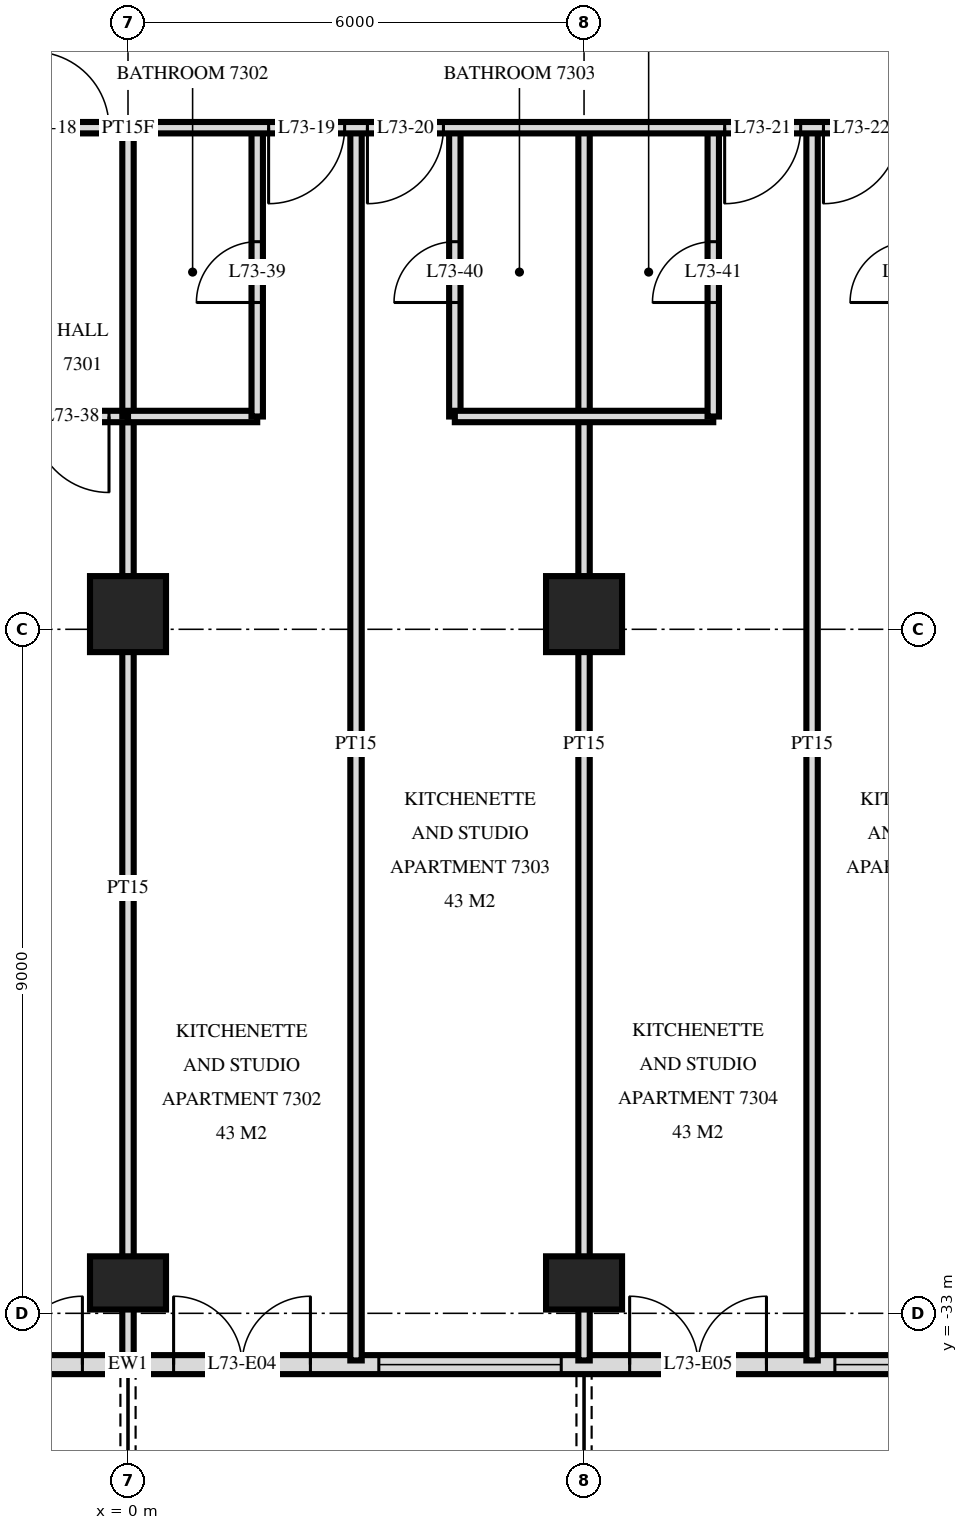
"""IFC4 building model, lengths in metres.
Left out: names, types, materials, properties, quantities, classifications, styles, units other than length and angle.
Written with IfcOpenShell. Run it as: python <this file> out.ifc"""

import sys

from ifc_helpers import new_model, si_unit, direction, frame, frame_2d, origin, origin_2d, place, context, subcontext, project, spatial, rectangle, extrude, element, fill, save


model = new_model("IFC4")
c1 = context("Model", 3, precision=1e-05, world=origin(), true_north=direction((0.0, 1.0)))
c2 = subcontext(c1, "Body", "Model", "MODEL_VIEW")
j1 = project(units=[si_unit("LENGTHUNIT", "METRE"), si_unit("PLANEANGLEUNIT", "RADIAN")], contexts=[c1])
p1 = place(None, origin())
s1 = spatial("IfcSite", under=j1, at=p1, CompositionType="ELEMENT")
p2 = place(p1, origin())
s2 = spatial("IfcBuilding", under=s1, at=p2, CompositionType="ELEMENT")
p3 = place(p2, frame((0.0, 0.0, 277.1)))
s3 = spatial("IfcBuildingStorey", under=s2, at=p3, CompositionType="ELEMENT", Elevation=277.1)
p4 = place(p3, frame((0.0, -32.6, 0.0), z_axis=(0.0, 0.0, 1.0), x_axis=(1.0, 0.0, 0.0)))
e1 = element("IfcColumn", 1, at=p4, inside=s3, PredefinedType="COLUMN", context=c2, shape_type="SweptSolid", body=[
    extrude(rectangle(XDim=1.0, YDim=0.7, at=origin_2d()), origin(), (0.0, 0.0, 1.0), 3.5),
])
p5 = place(p3, frame((0.0, -23.8, 0.0), z_axis=(0.0, 0.0, 1.0), x_axis=(1.0, 0.0, 0.0)))
e2 = element("IfcColumn", 2, at=p5, inside=s3, PredefinedType="COLUMN", context=c2, shape_type="SweptSolid", body=[
    extrude(rectangle(XDim=1.0, YDim=1.0, at=origin_2d()), origin(), (0.0, 0.0, 1.0), 3.5),
])
p6 = place(p3, frame((6.0, -32.6, 0.0), z_axis=(0.0, 0.0, 1.0), x_axis=(1.0, 0.0, 0.0)))
e3 = element("IfcColumn", 3, at=p6, inside=s3, PredefinedType="COLUMN", context=c2, shape_type="SweptSolid", body=[
    extrude(rectangle(XDim=1.0, YDim=0.7, at=origin_2d()), origin(), (0.0, 0.0, 1.0), 3.5),
])
p7 = place(p3, frame((6.0, -23.8, 0.0), z_axis=(0.0, 0.0, 1.0), x_axis=(1.0, 0.0, 0.0)))
e4 = element("IfcColumn", 4, at=p7, inside=s3, PredefinedType="COLUMN", context=c2, shape_type="SweptSolid", body=[
    extrude(rectangle(XDim=1.0, YDim=1.0, at=origin_2d()), origin(), (0.0, 0.0, 1.0), 3.5),
])
p8 = place(p3, frame((-18.575, -33.675, 0.0), z_axis=(0.0, 0.0, 1.0), x_axis=(1.0, 0.0, 0.0)))
e5 = element("IfcWall", 5, at=p8, inside=s3, PredefinedType="SOLIDWALL", context=c2, shape_type="SweptSolid", body=[
    extrude(rectangle(XDim=37.151, YDim=0.25, at=frame_2d((18.575, 0.0))), origin(), (0.0, 0.0, 1.0), 3.22),
])
p9 = place(p8, frame((4.175, 0.0, 0.0)))
e6 = element("IfcOpeningElement", 6, at=p9, cuts=e5, PredefinedType="OPENING", context=c2, shape_type="SweptSolid", body=[
    extrude(rectangle(XDim=1.8, YDim=2.4, at=frame_2d((0.9, 1.2))), frame((0.0, 0.135, 0.0), z_axis=(0.0, -1.0, 0.0), x_axis=(1.0, 0.0, 0.0)), (0.0, 0.0, 1.0), 0.27),
])
p10 = place(p8, frame((7.512, 0.0, 0.0)))
e7 = element("IfcOpeningElement", 7, at=p10, cuts=e5, PredefinedType="OPENING", context=c2, shape_type="SweptSolid", body=[
    extrude(rectangle(XDim=1.8, YDim=2.4, at=frame_2d((0.9, 1.2))), frame((0.0, 0.135, 0.0), z_axis=(0.0, -1.0, 0.0), x_axis=(1.0, 0.0, 0.0)), (0.0, 0.0, 1.0), 0.27),
])
p11 = place(p8, frame((10.287, 0.0, 0.9)))
e8 = element("IfcOpeningElement", 8, at=p11, cuts=e5, PredefinedType="OPENING", context=c2, shape_type="SweptSolid", body=[
    extrude(rectangle(XDim=1.8, YDim=1.5, at=frame_2d((0.9, 0.75))), frame((0.0, 0.135, 0.0), z_axis=(0.0, -1.0, 0.0), x_axis=(1.0, 0.0, 0.0)), (0.0, 0.0, 1.0), 0.27),
])
p12 = place(p8, frame((12.875, 0.0, 0.9)))
e9 = element("IfcOpeningElement", 9, at=p12, cuts=e5, PredefinedType="OPENING", context=c2, shape_type="SweptSolid", body=[
    extrude(rectangle(XDim=2.4, YDim=1.5, at=frame_2d((1.2, 0.75))), frame((0.0, 0.135, 0.0), z_axis=(0.0, -1.0, 0.0), x_axis=(1.0, 0.0, 0.0)), (0.0, 0.0, 1.0), 0.27),
])
p13 = place(p8, frame((16.175, 0.0, 0.0)))
e10 = element("IfcOpeningElement", 10, at=p13, cuts=e5, PredefinedType="OPENING", context=c2, shape_type="SweptSolid", body=[
    extrude(rectangle(XDim=1.8, YDim=2.4, at=frame_2d((0.9, 1.2))), frame((0.0, 0.135, 0.0), z_axis=(0.0, -1.0, 0.0), x_axis=(1.0, 0.0, 0.0)), (0.0, 0.0, 1.0), 0.27),
])
p14 = place(p8, frame((19.175, 0.0, 0.0)))
e11 = element("IfcOpeningElement", 11, at=p14, cuts=e5, PredefinedType="OPENING", context=c2, shape_type="SweptSolid", body=[
    extrude(rectangle(XDim=1.8, YDim=2.4, at=frame_2d((0.9, 1.2))), frame((0.0, 0.135, 0.0), z_axis=(0.0, -1.0, 0.0), x_axis=(1.0, 0.0, 0.0)), (0.0, 0.0, 1.0), 0.27),
])
p15 = place(p8, frame((21.875, 0.0, 0.9)))
e12 = element("IfcOpeningElement", 12, at=p15, cuts=e5, PredefinedType="OPENING", context=c2, shape_type="SweptSolid", body=[
    extrude(rectangle(XDim=2.4, YDim=1.5, at=frame_2d((1.2, 0.75))), frame((0.0, 0.135, 0.0), z_axis=(0.0, -1.0, 0.0), x_axis=(1.0, 0.0, 0.0)), (0.0, 0.0, 1.0), 0.27),
])
p16 = place(p8, frame((25.175, 0.0, 0.0)))
e13 = element("IfcOpeningElement", 13, at=p16, cuts=e5, PredefinedType="OPENING", context=c2, shape_type="SweptSolid", body=[
    extrude(rectangle(XDim=1.8, YDim=2.4, at=frame_2d((0.9, 1.2))), frame((0.0, 0.135, 0.0), z_axis=(0.0, -1.0, 0.0), x_axis=(1.0, 0.0, 0.0)), (0.0, 0.0, 1.0), 0.27),
])
p17 = place(p8, frame((27.875, 0.0, 0.9)))
e14 = element("IfcOpeningElement", 14, at=p17, cuts=e5, PredefinedType="OPENING", context=c2, shape_type="SweptSolid", body=[
    extrude(rectangle(XDim=2.4, YDim=1.5, at=frame_2d((1.2, 0.75))), frame((0.0, 0.135, 0.0), z_axis=(0.0, -1.0, 0.0), x_axis=(1.0, 0.0, 0.0)), (0.0, 0.0, 1.0), 0.27),
])
p18 = place(p8, frame((30.95, 0.0, 0.9)))
e15 = element("IfcOpeningElement", 15, at=p18, cuts=e5, PredefinedType="OPENING", context=c2, shape_type="SweptSolid", body=[
    extrude(rectangle(XDim=1.8, YDim=1.5, at=frame_2d((0.9, 0.75))), frame((0.0, 0.135, 0.0), z_axis=(0.0, -1.0, 0.0), x_axis=(1.0, 0.0, 0.0)), (0.0, 0.0, 1.0), 0.27),
])
p19 = place(p8, frame((34.175, 0.0, 0.0)))
e16 = element("IfcOpeningElement", 16, at=p19, cuts=e5, PredefinedType="OPENING", context=c2, shape_type="SweptSolid", body=[
    extrude(rectangle(XDim=1.8, YDim=2.4, at=frame_2d((0.9, 1.2))), frame((0.0, 0.135, 0.0), z_axis=(0.0, -1.0, 0.0), x_axis=(1.0, 0.0, 0.0)), (0.0, 0.0, 1.0), 0.27),
])
p20 = place(p3, frame((9.0, -33.62, 0.0), z_axis=(0.0, 0.0, 1.0), x_axis=(0.0, 1.0, 0.0)))
e17 = element("IfcWall", 17, at=p20, inside=s3, PredefinedType="PARTITIONING", context=c2, shape_type="SweptSolid", body=[
    extrude(rectangle(XDim=16.22, YDim=0.15, at=frame_2d((8.11, 0.0))), origin(), (0.0, 0.0, 1.0), 3.22),
])
p21 = place(p3, frame((7.7, -21.2, 0.0), z_axis=(0.0, 0.0, 1.0), x_axis=(0.0, 1.0, 0.0)))
e18 = element("IfcWall", 18, at=p21, inside=s3, PredefinedType="PARTITIONING", context=c2, shape_type="SweptSolid", body=[
    extrude(rectangle(XDim=3.8, YDim=0.15, at=frame_2d((1.9, 0.0))), origin(), (0.0, 0.0, 1.0), 3.22),
])
p22 = place(p21, frame((1.5, 0.0, 0.0)))
e19 = element("IfcOpeningElement", 19, at=p22, cuts=e18, PredefinedType="OPENING", context=c2, shape_type="SweptSolid", body=[
    extrude(rectangle(XDim=0.8, YDim=2.1, at=frame_2d((0.4, 1.05))), frame((0.0, 0.085, 0.0), z_axis=(0.0, -1.0, 0.0), x_axis=(1.0, 0.0, 0.0)), (0.0, 0.0, 1.0), 0.17),
])
p23 = place(p3, frame((6.0, -33.62, 0.0), z_axis=(0.0, 0.0, 1.0), x_axis=(0.0, 1.0, 0.0)))
e20 = element("IfcWall", 20, at=p23, inside=s3, PredefinedType="PARTITIONING", context=c2, shape_type="SweptSolid", body=[
    extrude(rectangle(XDim=16.22, YDim=0.15, at=frame_2d((8.11, 0.0))), origin(), (0.0, 0.0, 1.0), 3.22),
])
p24 = place(p3, frame((4.3, -21.2, 0.0), z_axis=(0.0, 0.0, 1.0), x_axis=(0.0, 1.0, 0.0)))
e21 = element("IfcWall", 21, at=p24, inside=s3, PredefinedType="PARTITIONING", context=c2, shape_type="SweptSolid", body=[
    extrude(rectangle(XDim=3.8, YDim=0.15, at=frame_2d((1.9, 0.0))), origin(), (0.0, 0.0, 1.0), 3.22),
])
p25 = place(p24, frame((1.5, 0.0, 0.0)))
e22 = element("IfcOpeningElement", 22, at=p25, cuts=e21, PredefinedType="OPENING", context=c2, shape_type="SweptSolid", body=[
    extrude(rectangle(XDim=0.8, YDim=2.1, at=frame_2d((0.4, 1.05))), frame((0.0, 0.085, 0.0), z_axis=(0.0, -1.0, 0.0), x_axis=(1.0, 0.0, 0.0)), (0.0, 0.0, 1.0), 0.17),
])
p26 = place(p3, frame((3.0, -33.62, 0.0), z_axis=(0.0, 0.0, 1.0), x_axis=(0.0, 1.0, 0.0)))
e23 = element("IfcWall", 23, at=p26, inside=s3, PredefinedType="PARTITIONING", context=c2, shape_type="SweptSolid", body=[
    extrude(rectangle(XDim=16.22, YDim=0.15, at=frame_2d((8.11, 0.0))), origin(), (0.0, 0.0, 1.0), 3.22),
])
p27 = place(p3, frame((1.7, -21.2, 0.0), z_axis=(0.0, 0.0, 1.0), x_axis=(0.0, 1.0, 0.0)))
e24 = element("IfcWall", 24, at=p27, inside=s3, PredefinedType="PARTITIONING", context=c2, shape_type="SweptSolid", body=[
    extrude(rectangle(XDim=3.8, YDim=0.15, at=frame_2d((1.9, 0.0))), origin(), (0.0, 0.0, 1.0), 3.22),
])
p28 = place(p27, frame((1.5, 0.0, 0.0)))
e25 = element("IfcOpeningElement", 25, at=p28, cuts=e24, PredefinedType="OPENING", context=c2, shape_type="SweptSolid", body=[
    extrude(rectangle(XDim=0.8, YDim=2.1, at=frame_2d((0.4, 1.05))), frame((0.0, 0.085, 0.0), z_axis=(0.0, -1.0, 0.0), x_axis=(1.0, 0.0, 0.0)), (0.0, 0.0, 1.0), 0.17),
])
p29 = place(p3, frame((0.0, -21.2, 0.0), z_axis=(0.0, 0.0, 1.0), x_axis=(0.0, 1.0, 0.0)))
e26 = element("IfcWall", 26, at=p29, inside=s3, PredefinedType="PARTITIONING", context=c2, shape_type="SweptSolid", body=[
    extrude(rectangle(XDim=3.8, YDim=0.15, at=frame_2d((1.9, 0.0))), origin(), (0.0, 0.0, 1.0), 3.22),
])
p30 = place(p3, frame((0.0, -33.62, 0.0), z_axis=(0.0, 0.0, 1.0), x_axis=(0.0, 1.0, 0.0)))
e27 = element("IfcWall", 27, at=p30, inside=s3, PredefinedType="PARTITIONING", context=c2, shape_type="SweptSolid", body=[
    extrude(rectangle(XDim=12.42, YDim=0.15, at=frame_2d((6.21, 0.0))), origin(), (0.0, 0.0, 1.0), 3.22),
])
p31 = place(p3, frame((-1.5, -21.2, 0.0), z_axis=(0.0, 0.0, 1.0), x_axis=(1.0, 0.0, 0.0)))
e28 = element("IfcWall", 28, at=p31, inside=s3, PredefinedType="PARTITIONING", context=c2, shape_type="SweptSolid", body=[
    extrude(rectangle(XDim=1.5, YDim=0.15, at=frame_2d((0.75, 0.0))), origin(), (0.0, 0.0, 1.0), 3.22),
])
p32 = place(p31, frame((0.25, 0.0, 0.0)))
e29 = element("IfcOpeningElement", 29, at=p32, cuts=e28, PredefinedType="OPENING", context=c2, shape_type="SweptSolid", body=[
    extrude(rectangle(XDim=1.0, YDim=2.1, at=frame_2d((0.5, 1.05))), frame((0.0, 0.085, 0.0), z_axis=(0.0, -1.0, 0.0), x_axis=(1.0, 0.0, 0.0)), (0.0, 0.0, 1.0), 0.17),
])
p33 = place(p3, frame((0.0, -21.2, 0.0), z_axis=(0.0, 0.0, 1.0), x_axis=(1.0, 0.0, 0.0)))
e30 = element("IfcWall", 30, at=p33, inside=s3, PredefinedType="PARTITIONING", context=c2, shape_type="SweptSolid", body=[
    extrude(rectangle(XDim=1.7, YDim=0.15, at=frame_2d((0.85, 0.0))), origin(), (0.0, 0.0, 1.0), 3.22),
])
p34 = place(p3, frame((4.3, -21.2, 0.0), z_axis=(0.0, 0.0, 1.0), x_axis=(1.0, 0.0, 0.0)))
e31 = element("IfcWall", 31, at=p34, inside=s3, PredefinedType="PARTITIONING", context=c2, shape_type="SweptSolid", body=[
    extrude(rectangle(XDim=3.4, YDim=0.15, at=frame_2d((1.7, 0.0))), origin(), (0.0, 0.0, 1.0), 3.22),
])
p35 = place(p3, frame((-22.92, -17.4, 0.0), z_axis=(0.0, 0.0, 1.0), x_axis=(1.0, 0.0, 0.0)))
e32 = element("IfcWall", 32, at=p35, inside=s3, PredefinedType="PARTITIONING", context=c2, shape_type="SweptSolid", body=[
    extrude(rectangle(XDim=45.84, YDim=0.15, at=frame_2d((22.92, 0.0))), origin(), (0.0, 0.0, 1.0), 3.22),
])
p36 = place(p35, frame((21.67, 0.0, 0.0)))
e33 = element("IfcOpeningElement", 33, at=p36, cuts=e32, PredefinedType="OPENING", context=c2, shape_type="SweptSolid", body=[
    extrude(rectangle(XDim=1.0, YDim=2.1, at=frame_2d((0.5, 1.05))), frame((0.0, 0.085, 0.0), z_axis=(0.0, -1.0, 0.0), x_axis=(1.0, 0.0, 0.0)), (0.0, 0.0, 1.0), 0.17),
])
p37 = place(p35, frame((24.77, 0.0, 0.0)))
e34 = element("IfcOpeningElement", 34, at=p37, cuts=e32, PredefinedType="OPENING", context=c2, shape_type="SweptSolid", body=[
    extrude(rectangle(XDim=1.0, YDim=2.1, at=frame_2d((0.5, 1.05))), frame((0.0, 0.085, 0.0), z_axis=(0.0, -1.0, 0.0), x_axis=(1.0, 0.0, 0.0)), (0.0, 0.0, 1.0), 0.17),
])
p38 = place(p35, frame((26.07, 0.0, 0.0)))
e35 = element("IfcOpeningElement", 35, at=p38, cuts=e32, PredefinedType="OPENING", context=c2, shape_type="SweptSolid", body=[
    extrude(rectangle(XDim=1.0, YDim=2.1, at=frame_2d((0.5, 1.05))), frame((0.0, 0.085, 0.0), z_axis=(0.0, -1.0, 0.0), x_axis=(1.0, 0.0, 0.0)), (0.0, 0.0, 1.0), 0.17),
])
p39 = place(p35, frame((30.77, 0.0, 0.0)))
e36 = element("IfcOpeningElement", 36, at=p39, cuts=e32, PredefinedType="OPENING", context=c2, shape_type="SweptSolid", body=[
    extrude(rectangle(XDim=1.0, YDim=2.1, at=frame_2d((0.5, 1.05))), frame((0.0, 0.085, 0.0), z_axis=(0.0, -1.0, 0.0), x_axis=(1.0, 0.0, 0.0)), (0.0, 0.0, 1.0), 0.17),
])
p40 = place(p35, frame((32.07, 0.0, 0.0)))
e37 = element("IfcOpeningElement", 37, at=p40, cuts=e32, PredefinedType="OPENING", context=c2, shape_type="SweptSolid", body=[
    extrude(rectangle(XDim=1.0, YDim=2.1, at=frame_2d((0.5, 1.05))), frame((0.0, 0.085, 0.0), z_axis=(0.0, -1.0, 0.0), x_axis=(1.0, 0.0, 0.0)), (0.0, 0.0, 1.0), 0.17),
])
p41 = place(p35, frame((9.42, 0.0, 0.0)))
e38 = element("IfcOpeningElement", 38, at=p41, cuts=e32, PredefinedType="OPENING", context=c2, shape_type="SweptSolid", body=[
    extrude(rectangle(XDim=1.0, YDim=2.1, at=frame_2d((0.5, 1.05))), frame((0.0, 0.085, 0.0), z_axis=(0.0, -1.0, 0.0), x_axis=(1.0, 0.0, 0.0)), (0.0, 0.0, 1.0), 0.17),
])
p42 = place(p35, frame((2.67, 0.0, 0.0)))
e39 = element("IfcOpeningElement", 39, at=p42, cuts=e32, PredefinedType="OPENING", context=c2, shape_type="SweptSolid", body=[
    extrude(rectangle(XDim=1.0, YDim=2.1, at=frame_2d((0.5, 1.05))), frame((0.0, 0.085, 0.0), z_axis=(0.0, -1.0, 0.0), x_axis=(1.0, 0.0, 0.0)), (0.0, 0.0, 1.0), 0.17),
])
p43 = place(p35, frame((37.82, 0.0, 0.0)))
e40 = element("IfcOpeningElement", 40, at=p43, cuts=e32, PredefinedType="OPENING", context=c2, shape_type="SweptSolid", body=[
    extrude(rectangle(XDim=1.0, YDim=2.1, at=frame_2d((0.5, 1.05))), frame((0.0, 0.085, 0.0), z_axis=(0.0, -1.0, 0.0), x_axis=(1.0, 0.0, 0.0)), (0.0, 0.0, 1.0), 0.17),
])
p44 = place(p13, origin())
e41 = element("IfcDoor", 41, at=p44, inside=s3, OperationType="DOUBLE_DOOR_SINGLE_SWING", PredefinedType="DOOR", context=c2, shape_type="SweptSolid", body=[
    extrude(rectangle(XDim=1.8, YDim=2.4, at=frame_2d((0.9, 1.2))), frame((0.0, 0.025, 0.0), z_axis=(0.0, -1.0, 0.0), x_axis=(1.0, 0.0, 0.0)), (0.0, 0.0, 1.0), 0.05),
])
fill(e10, e41)
p45 = place(p14, origin())
e42 = element("IfcDoor", 42, at=p45, inside=s3, OperationType="DOUBLE_DOOR_SINGLE_SWING", PredefinedType="DOOR", context=c2, shape_type="SweptSolid", body=[
    extrude(rectangle(XDim=1.8, YDim=2.4, at=frame_2d((0.9, 1.2))), frame((0.0, 0.025, 0.0), z_axis=(0.0, -1.0, 0.0), x_axis=(1.0, 0.0, 0.0)), (0.0, 0.0, 1.0), 0.05),
])
fill(e11, e42)
p46 = place(p15, origin())
e43 = element("IfcWindow", 43, at=p46, inside=s3, PartitioningType="SINGLE_PANEL", PredefinedType="WINDOW", context=c2, shape_type="SweptSolid", body=[
    extrude(rectangle(XDim=2.4, YDim=1.5, at=frame_2d((1.2, 0.75))), frame((0.0, 0.03, 0.0), z_axis=(0.0, -1.0, 0.0), x_axis=(1.0, 0.0, 0.0)), (0.0, 0.0, 1.0), 0.06),
])
fill(e12, e43)
p47 = place(p16, origin())
e44 = element("IfcDoor", 44, at=p47, inside=s3, OperationType="DOUBLE_DOOR_SINGLE_SWING", PredefinedType="DOOR", context=c2, shape_type="SweptSolid", body=[
    extrude(rectangle(XDim=1.8, YDim=2.4, at=frame_2d((0.9, 1.2))), frame((0.0, 0.025, 0.0), z_axis=(0.0, -1.0, 0.0), x_axis=(1.0, 0.0, 0.0)), (0.0, 0.0, 1.0), 0.05),
])
fill(e13, e44)
p48 = place(p17, origin())
e45 = element("IfcWindow", 45, at=p48, inside=s3, PartitioningType="SINGLE_PANEL", PredefinedType="WINDOW", context=c2, shape_type="SweptSolid", body=[
    extrude(rectangle(XDim=2.4, YDim=1.5, at=frame_2d((1.2, 0.75))), frame((0.0, 0.03, 0.0), z_axis=(0.0, -1.0, 0.0), x_axis=(1.0, 0.0, 0.0)), (0.0, 0.0, 1.0), 0.06),
])
fill(e14, e45)
p49 = place(p36, origin())
e46 = element("IfcDoor", 46, at=p49, inside=s3, OperationType="SINGLE_SWING_RIGHT", PredefinedType="DOOR", context=c2, shape_type="SweptSolid", body=[
    extrude(rectangle(XDim=1.0, YDim=2.1, at=frame_2d((0.5, 1.05))), frame((0.0, 0.025, 0.0), z_axis=(0.0, -1.0, 0.0), x_axis=(1.0, 0.0, 0.0)), (0.0, 0.0, 1.0), 0.05),
])
fill(e33, e46)
p50 = place(p37, frame((0.5, 0.0, 0.0), z_axis=(0.0, 0.0, 1.0), x_axis=(-1.0, 0.0, 0.0)))
e47 = element("IfcDoor", 47, at=p50, inside=s3, OperationType="SINGLE_SWING_LEFT", PredefinedType="DOOR", context=c2, shape_type="SweptSolid", body=[
    extrude(rectangle(XDim=1.0, YDim=2.1, at=frame_2d((0.0, 1.05))), frame((0.0, -0.025, 0.0), z_axis=(0.0, 1.0, 0.0), x_axis=(-1.0, 0.0, 0.0)), (0.0, 0.0, 1.0), 0.05),
])
fill(e34, e47)
p51 = place(p38, frame((0.5, 0.0, 0.0), z_axis=(0.0, 0.0, 1.0), x_axis=(-1.0, 0.0, 0.0)))
e48 = element("IfcDoor", 48, at=p51, inside=s3, OperationType="SINGLE_SWING_LEFT", PredefinedType="DOOR", context=c2, shape_type="SweptSolid", body=[
    extrude(rectangle(XDim=1.0, YDim=2.1, at=frame_2d((0.0, 1.05))), frame((0.0, -0.025, 0.0), z_axis=(0.0, 1.0, 0.0), x_axis=(-1.0, 0.0, 0.0)), (0.0, 0.0, 1.0), 0.05),
])
fill(e35, e48)
p52 = place(p39, frame((0.5, 0.0, 0.0), z_axis=(0.0, 0.0, 1.0), x_axis=(-1.0, 0.0, 0.0)))
e49 = element("IfcDoor", 49, at=p52, inside=s3, OperationType="SINGLE_SWING_LEFT", PredefinedType="DOOR", context=c2, shape_type="SweptSolid", body=[
    extrude(rectangle(XDim=1.0, YDim=2.1, at=frame_2d((0.0, 1.05))), frame((0.0, -0.025, 0.0), z_axis=(0.0, 1.0, 0.0), x_axis=(-1.0, 0.0, 0.0)), (0.0, 0.0, 1.0), 0.05),
])
fill(e36, e49)
p53 = place(p40, frame((0.5, 0.0, 0.0), z_axis=(0.0, 0.0, 1.0), x_axis=(-1.0, 0.0, 0.0)))
e50 = element("IfcDoor", 50, at=p53, inside=s3, OperationType="SINGLE_SWING_LEFT", PredefinedType="DOOR", context=c2, shape_type="SweptSolid", body=[
    extrude(rectangle(XDim=1.0, YDim=2.1, at=frame_2d((0.0, 1.05))), frame((0.0, -0.025, 0.0), z_axis=(0.0, 1.0, 0.0), x_axis=(-1.0, 0.0, 0.0)), (0.0, 0.0, 1.0), 0.05),
])
fill(e37, e50)
p54 = place(p32, frame((0.5, 0.0, 0.0), z_axis=(0.0, 0.0, 1.0), x_axis=(-1.0, 0.0, 0.0)))
e51 = element("IfcDoor", 51, at=p54, inside=s3, OperationType="SINGLE_SWING_RIGHT", PredefinedType="DOOR", context=c2, shape_type="SweptSolid", body=[
    extrude(rectangle(XDim=1.0, YDim=2.1, at=frame_2d((0.0, 1.05))), frame((0.0, -0.025, 0.0), z_axis=(0.0, 1.0, 0.0), x_axis=(-1.0, 0.0, 0.0)), (0.0, 0.0, 1.0), 0.05),
])
fill(e29, e51)
p55 = place(p28, origin())
e52 = element("IfcDoor", 52, at=p55, inside=s3, OperationType="SINGLE_SWING_RIGHT", PredefinedType="DOOR", context=c2, shape_type="SweptSolid", body=[
    extrude(rectangle(XDim=0.8, YDim=2.1, at=frame_2d((0.4, 1.05))), frame((0.0, 0.025, 0.0), z_axis=(0.0, -1.0, 0.0), x_axis=(1.0, 0.0, 0.0)), (0.0, 0.0, 1.0), 0.05),
])
fill(e25, e52)
p56 = place(p25, origin())
e53 = element("IfcDoor", 53, at=p56, inside=s3, OperationType="SINGLE_SWING_RIGHT", PredefinedType="DOOR", context=c2, shape_type="SweptSolid", body=[
    extrude(rectangle(XDim=0.8, YDim=2.1, at=frame_2d((0.4, 1.05))), frame((0.0, 0.025, 0.0), z_axis=(0.0, -1.0, 0.0), x_axis=(1.0, 0.0, 0.0)), (0.0, 0.0, 1.0), 0.05),
])
fill(e22, e53)
p57 = place(p22, origin())
e54 = element("IfcDoor", 54, at=p57, inside=s3, OperationType="SINGLE_SWING_RIGHT", PredefinedType="DOOR", context=c2, shape_type="SweptSolid", body=[
    extrude(rectangle(XDim=0.8, YDim=2.1, at=frame_2d((0.4, 1.05))), frame((0.0, 0.025, 0.0), z_axis=(0.0, -1.0, 0.0), x_axis=(1.0, 0.0, 0.0)), (0.0, 0.0, 1.0), 0.05),
])
fill(e19, e54)
save(model, sys.argv[1])
